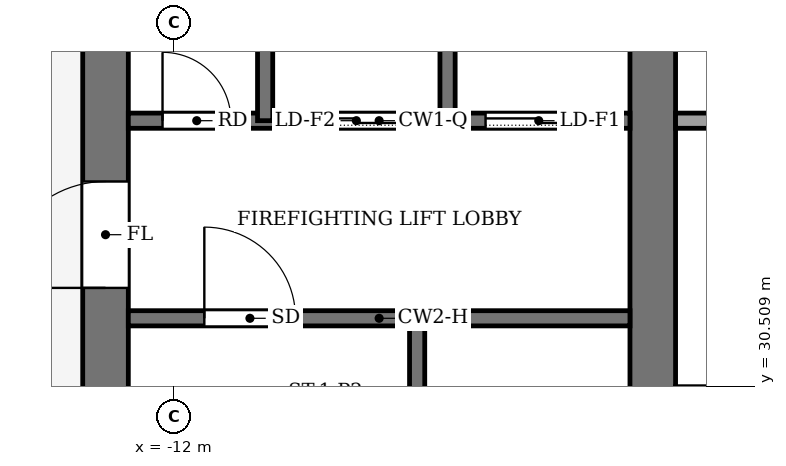
"""IFC4 building model, lengths in metres.
Left out: names, types, materials, properties, quantities, classifications, styles, units other than length and angle.
Written with IfcOpenShell. Run it as: python <this file> out.ifc"""

import sys

from ifc_helpers import new_model, si_unit, direction, frame, frame_2d, origin, place, context, subcontext, project, spatial, rectangle, extrude, element, fill, save


model = new_model("IFC4")
c1 = context("Model", 3, precision=1e-05, world=origin(), true_north=direction((0.0, 1.0)))
c2 = subcontext(c1, "Body", "Model", "MODEL_VIEW")
j1 = project(units=[si_unit("LENGTHUNIT", "METRE"), si_unit("PLANEANGLEUNIT", "RADIAN")], contexts=[c1])
p1 = place(None, origin())
s1 = spatial("IfcSite", under=j1, at=p1, CompositionType="ELEMENT")
p2 = place(p1, origin())
s2 = spatial("IfcBuilding", under=s1, at=p2, CompositionType="ELEMENT")
p3 = place(p2, frame((0.0, 0.0, 340.5)))
s3 = spatial("IfcBuildingStorey", under=s2, at=p3, CompositionType="ELEMENT", Elevation=340.5)
p4 = place(p3, frame((-12.9, 18.4, -0.15), z_axis=(0.0, 0.0, 1.0), x_axis=(0.0, 1.0, 0.0)))
e1 = element("IfcWall", 1, at=p4, inside=s3, PredefinedType="SHEAR", context=c2, shape_type="SweptSolid", body=[
    extrude(rectangle(XDim=19.2, YDim=0.6, at=frame_2d((9.6, 0.0))), origin(), (0.0, 0.0, 1.0), 9.0),
])
p5 = place(p4, frame((2.8, 0.0, 0.15)))
e2 = element("IfcOpeningElement", 2, at=p5, cuts=e1, PredefinedType="OPENING", context=c2, shape_type="SweptSolid", body=[
    extrude(rectangle(XDim=2.4, YDim=2.4, at=frame_2d((1.2, 1.2))), frame((0.0, 0.31, 0.0), z_axis=(0.0, -1.0, 0.0), x_axis=(1.0, 0.0, 0.0)), (0.0, 0.0, 1.0), 0.62),
])
p6 = place(p4, frame((13.4, 0.0, 0.15)))
e3 = element("IfcOpeningElement", 3, at=p6, cuts=e1, PredefinedType="OPENING", context=c2, shape_type="SweptSolid", body=[
    extrude(rectangle(XDim=1.4, YDim=2.2, at=frame_2d((0.7, 1.1))), frame((0.0, 0.31, 0.0), z_axis=(0.0, -1.0, 0.0), x_axis=(1.0, 0.0, 0.0)), (0.0, 0.0, 1.0), 0.62),
])
p7 = place(p3, frame((-5.7, 18.4, -0.15), z_axis=(0.0, 0.0, 1.0), x_axis=(0.0, 1.0, 0.0)))
e4 = element("IfcWall", 4, at=p7, inside=s3, PredefinedType="SHEAR", context=c2, shape_type="SweptSolid", body=[
    extrude(rectangle(XDim=19.2, YDim=0.6, at=frame_2d((9.6, 0.0))), origin(), (0.0, 0.0, 1.0), 9.0),
])
p8 = place(p7, frame((8.35, 0.0, 0.15)))
e5 = element("IfcOpeningElement", 5, at=p8, cuts=e4, PredefinedType="OPENING", context=c2, shape_type="SweptSolid", body=[
    extrude(rectangle(XDim=0.9, YDim=2.1, at=frame_2d((0.45, 1.05))), frame((0.0, 0.31, 0.0), z_axis=(0.0, -1.0, 0.0), x_axis=(1.0, 0.0, 0.0)), (0.0, 0.0, 1.0), 0.62),
])
p9 = place(p3, frame((-12.6, 31.4, 0.0), z_axis=(0.0, 0.0, 1.0), x_axis=(1.0, 0.0, 0.0)))
e6 = element("IfcWall", 6, at=p9, inside=s3, PredefinedType="PARTITIONING", context=c2, shape_type="SweptSolid", body=[
    extrude(rectangle(XDim=6.6, YDim=0.2, at=frame_2d((3.3, 0.0))), origin(), (0.0, 0.0, 1.0), 8.85),
])
p10 = place(p9, frame((1.0, 0.0, 0.0)))
e7 = element("IfcOpeningElement", 7, at=p10, cuts=e6, PredefinedType="OPENING", context=c2, shape_type="SweptSolid", body=[
    extrude(rectangle(XDim=1.2, YDim=2.2, at=frame_2d((0.6, 1.1))), frame((0.0, 0.11, 0.0), z_axis=(0.0, -1.0, 0.0), x_axis=(1.0, 0.0, 0.0)), (0.0, 0.0, 1.0), 0.22),
])
p11 = place(p3, frame((-12.6, 34.0, 0.0), z_axis=(0.0, 0.0, 1.0), x_axis=(1.0, 0.0, 0.0)))
e8 = element("IfcWall", 8, at=p11, inside=s3, PredefinedType="PARTITIONING", context=c2, shape_type="SweptSolid", body=[
    extrude(rectangle(XDim=6.6, YDim=0.2, at=frame_2d((3.3, 0.0))), origin(), (0.0, 0.0, 1.0), 8.85),
])
p12 = place(p11, frame((4.7, 0.0, 0.0)))
e9 = element("IfcOpeningElement", 9, at=p12, cuts=e8, PredefinedType="OPENING", context=c2, shape_type="SweptSolid", body=[
    extrude(rectangle(XDim=1.4, YDim=2.2, at=frame_2d((0.7, 1.1))), frame((0.0, 0.11, 0.0), z_axis=(0.0, -1.0, 0.0), x_axis=(1.0, 0.0, 0.0)), (0.0, 0.0, 1.0), 0.22),
])
p13 = place(p11, frame((2.3, 0.0, 0.0)))
e10 = element("IfcOpeningElement", 10, at=p13, cuts=e8, PredefinedType="OPENING", context=c2, shape_type="SweptSolid", body=[
    extrude(rectangle(XDim=1.4, YDim=2.2, at=frame_2d((0.7, 1.1))), frame((0.0, 0.11, 0.0), z_axis=(0.0, -1.0, 0.0), x_axis=(1.0, 0.0, 0.0)), (0.0, 0.0, 1.0), 0.22),
])
p14 = place(p11, frame((0.45, 0.0, 0.0)))
e11 = element("IfcOpeningElement", 11, at=p14, cuts=e8, PredefinedType="OPENING", context=c2, shape_type="SweptSolid", body=[
    extrude(rectangle(XDim=0.9, YDim=2.1, at=frame_2d((0.45, 1.05))), frame((0.0, 0.11, 0.0), z_axis=(0.0, -1.0, 0.0), x_axis=(1.0, 0.0, 0.0)), (0.0, 0.0, 1.0), 0.22),
])
p15 = place(p3, frame((-5.4, 34.0, 0.0), z_axis=(0.0, 0.0, 1.0), x_axis=(1.0, 0.0, 0.0)))
e12 = element("IfcWall", 12, at=p15, inside=s3, PredefinedType="PARTITIONING", context=c2, shape_type="SweptSolid", body=[
    extrude(rectangle(XDim=10.8, YDim=0.2, at=frame_2d((5.4, 0.0))), origin(), (0.0, 0.0, 1.0), 8.85),
])
p16 = place(p15, frame((8.95, 0.0, 0.0)))
e13 = element("IfcOpeningElement", 13, at=p16, cuts=e12, PredefinedType="OPENING", context=c2, shape_type="SweptSolid", body=[
    extrude(rectangle(XDim=1.0, YDim=2.1, at=frame_2d((0.5, 1.05))), frame((0.0, 0.11, 0.0), z_axis=(0.0, -1.0, 0.0), x_axis=(1.0, 0.0, 0.0)), (0.0, 0.0, 1.0), 0.22),
])
p17 = place(p3, frame((-10.8, 34.0, 0.0), z_axis=(0.0, 0.0, 1.0), x_axis=(0.0, 1.0, 0.0)))
e14 = element("IfcWall", 14, at=p17, inside=s3, PredefinedType="PARTITIONING", context=c2, shape_type="SweptSolid", body=[
    extrude(rectangle(XDim=3.6, YDim=0.2, at=frame_2d((1.8, 0.0))), origin(), (0.0, 0.0, 1.0), 8.85),
])
p18 = place(p3, frame((-8.8, 24.0, 0.0), z_axis=(0.0, 0.0, 1.0), x_axis=(0.0, 1.0, 0.0)))
e15 = element("IfcWall", 15, at=p18, inside=s3, PredefinedType="PARTITIONING", context=c2, shape_type="SweptSolid", body=[
    extrude(rectangle(XDim=7.4, YDim=0.2, at=frame_2d((3.7, 0.0))), origin(), (0.0, 0.0, 1.0), 8.85),
])
p19 = place(p3, frame((-8.4, 34.0, 0.0), z_axis=(0.0, 0.0, 1.0), x_axis=(0.0, 1.0, 0.0)))
e16 = element("IfcWall", 16, at=p19, inside=s3, PredefinedType="PARTITIONING", context=c2, shape_type="SweptSolid", body=[
    extrude(rectangle(XDim=3.6, YDim=0.2, at=frame_2d((1.8, 0.0))), origin(), (0.0, 0.0, 1.0), 8.85),
])
p20 = place(p12, origin())
e17 = element("IfcDoor", 17, at=p20, inside=s3, OperationType="SLIDING_TO_LEFT", PredefinedType="DOOR", context=c2, shape_type="SweptSolid", body=[
    extrude(rectangle(XDim=1.4, YDim=2.2, at=frame_2d((0.7, 1.1))), frame((0.0, 0.025, 0.0), z_axis=(0.0, -1.0, 0.0), x_axis=(1.0, 0.0, 0.0)), (0.0, 0.0, 1.0), 0.05),
])
fill(e9, e17)
p21 = place(p13, origin())
e18 = element("IfcDoor", 18, at=p21, inside=s3, OperationType="SLIDING_TO_LEFT", PredefinedType="DOOR", context=c2, shape_type="SweptSolid", body=[
    extrude(rectangle(XDim=1.4, YDim=2.2, at=frame_2d((0.7, 1.1))), frame((0.0, 0.025, 0.0), z_axis=(0.0, -1.0, 0.0), x_axis=(1.0, 0.0, 0.0)), (0.0, 0.0, 1.0), 0.05),
])
fill(e10, e18)
p22 = place(p14, origin())
e19 = element("IfcDoor", 19, at=p22, inside=s3, OperationType="SINGLE_SWING_LEFT", PredefinedType="DOOR", context=c2, shape_type="SweptSolid", body=[
    extrude(rectangle(XDim=0.9, YDim=2.1, at=frame_2d((0.45, 1.05))), frame((0.0, 0.025, 0.0), z_axis=(0.0, -1.0, 0.0), x_axis=(1.0, 0.0, 0.0)), (0.0, 0.0, 1.0), 0.05),
])
fill(e11, e19)
p23 = place(p10, origin())
e20 = element("IfcDoor", 20, at=p23, inside=s3, OperationType="SINGLE_SWING_LEFT", PredefinedType="DOOR", context=c2, shape_type="SweptSolid", body=[
    extrude(rectangle(XDim=1.2, YDim=2.2, at=frame_2d((0.6, 1.1))), frame((0.0, 0.025, 0.0), z_axis=(0.0, -1.0, 0.0), x_axis=(1.0, 0.0, 0.0)), (0.0, 0.0, 1.0), 0.05),
])
fill(e7, e20)
p24 = place(p6, origin())
e21 = element("IfcDoor", 21, at=p24, inside=s3, OperationType="SINGLE_SWING_LEFT", PredefinedType="DOOR", context=c2, shape_type="SweptSolid", body=[
    extrude(rectangle(XDim=1.4, YDim=2.2, at=frame_2d((0.7, 1.1))), frame((0.0, 0.025, 0.0), z_axis=(0.0, -1.0, 0.0), x_axis=(1.0, 0.0, 0.0)), (0.0, 0.0, 1.0), 0.05),
])
fill(e3, e21)
save(model, sys.argv[1])
